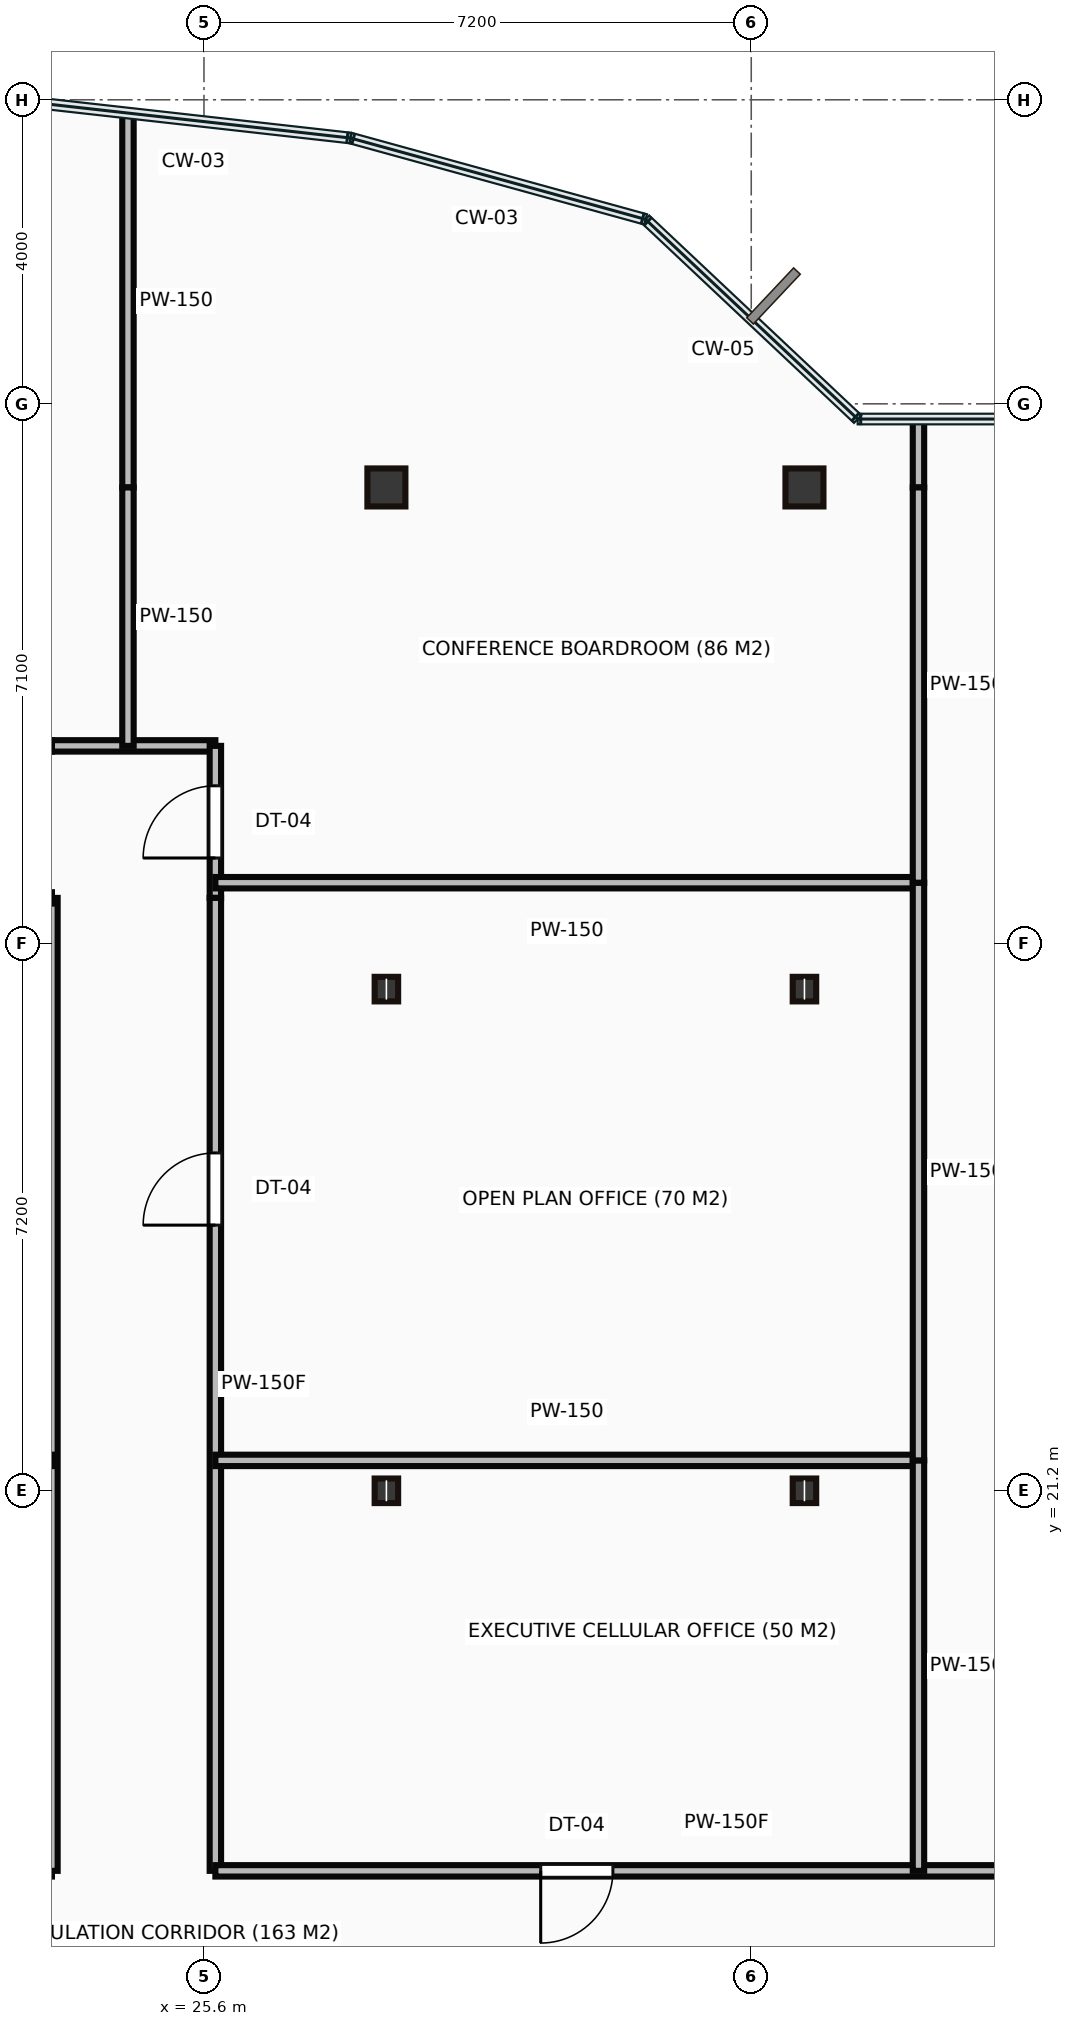
"""IFC4 building model, lengths in metres.
Left out: names, types, materials, properties, quantities, classifications, styles, units other than length and angle.
Written with IfcOpenShell. Run it as: python <this file> out.ifc"""

import sys

from ifc_helpers import new_model, si_unit, direction, frame, frame_2d, origin, origin_2d, place, context, subcontext, project, spatial, rectangle, hollow_rectangle, i_section, extrude, source, transform, mapped, element, fill, save


model = new_model("IFC4")
c1 = context("Model", 3, precision=1e-05, world=origin(), true_north=direction((0.0, 1.0)))
c2 = subcontext(c1, "Body", "Model", "MODEL_VIEW")
j1 = project(units=[si_unit("LENGTHUNIT", "METRE"), si_unit("PLANEANGLEUNIT", "RADIAN")], contexts=[c1])
p1 = place(None, origin())
s1 = spatial("IfcSite", under=j1, at=p1, CompositionType="ELEMENT")
p2 = place(p1, origin())
s2 = spatial("IfcBuilding", under=s1, at=p2, CompositionType="ELEMENT")
p3 = place(p2, frame((0.0, 0.0, 255.15)))
s3 = spatial("IfcBuildingStorey", under=s2, at=p3, CompositionType="ELEMENT", Elevation=255.15)
m1 = source(origin(), c2, "Body", "SweptSolid", [
    extrude(i_section(OverallWidth=0.309, OverallDepth=0.323, WebThickness=0.014, FlangeThickness=0.023, at=origin_2d()), origin(), (0.0, 0.0, 1.0), 3.65),
])
for number, where, z_axis, x_axis in (
    (1, (28.0, 21.2, 0.0), (0.0, 0.0, 1.0), (1.0, 0.0, 0.0)),
    (2, (28.0, 27.8, 0.0), (0.0, 0.0, 1.0), (1.0, 0.0, 0.0)),
):
    element("IfcColumn", number, at=place(p3, frame(where, z_axis=z_axis, x_axis=x_axis)), inside=s3, PredefinedType="COLUMN", context=c2, shape_type="MappedRepresentation", body=[
        mapped(m1, transform((0.0, 0.0, 0.0))),
    ])
m2 = source(origin(), c2, "Body", "SweptSolid", [
    extrude(hollow_rectangle(XDim=0.5, YDim=0.5, WallThickness=0.022, at=origin_2d()), origin(), (0.0, 0.0, 1.0), 3.65),
])
p4 = place(p3, frame((28.0, 34.4, 0.0), z_axis=(0.0, 0.0, 1.0), x_axis=(1.0, 0.0, 0.0)))
e3 = element("IfcColumn", 3, at=p4, inside=s3, PredefinedType="COLUMN", context=c2, shape_type="MappedRepresentation", body=[
    mapped(m2, transform((0.0, 0.0, 0.0))),
])
for number, where, z_axis, x_axis in (
    (4, (33.5, 21.2, 0.0), (0.0, 0.0, 1.0), (1.0, 0.0, 0.0)),
    (5, (33.5, 27.8, 0.0), (0.0, 0.0, 1.0), (1.0, 0.0, 0.0)),
):
    element("IfcColumn", number, at=place(p3, frame(where, z_axis=z_axis, x_axis=x_axis)), inside=s3, PredefinedType="COLUMN", context=c2, shape_type="MappedRepresentation", body=[
        mapped(m1, transform((0.0, 0.0, 0.0))),
    ])
p5 = place(p3, frame((33.5, 34.4, 0.0), z_axis=(0.0, 0.0, 1.0), x_axis=(1.0, 0.0, 0.0)))
e6 = element("IfcColumn", 6, at=p5, inside=s3, PredefinedType="COLUMN", context=c2, shape_type="MappedRepresentation", body=[
    mapped(m2, transform((0.0, 0.0, 0.0))),
])
m3 = source(origin(), c2, "Body", "SweptSolid", [
    extrude(rectangle(XDim=11.65, YDim=0.15, at=frame_2d((5.825, 0.0))), origin(), (0.0, 0.0, 1.0), 3.4),
])
p6 = place(p3, frame((11.95, 31.0, 0.0), z_axis=(0.0, 0.0, 1.0), x_axis=(1.0, 0.0, 0.0)))
e7 = element("IfcWall", 7, at=p6, inside=s3, PredefinedType="PARTITIONING", context=c2, shape_type="MappedRepresentation", body=[
    mapped(m3, transform((0.0, 0.0, 0.0))),
])
p7 = place(p6, frame((5.35, 0.0, 0.0)))
e8 = element("IfcOpeningElement", 8, at=p7, cuts=e7, PredefinedType="OPENING", context=c2, shape_type="SweptSolid", body=[
    extrude(rectangle(XDim=0.95, YDim=2.15, at=frame_2d((0.475, 1.075))), frame((0.0, 0.085, 0.0), z_axis=(0.0, -1.0, 0.0), x_axis=(1.0, 0.0, 0.0)), (0.0, 0.0, 1.0), 0.17),
])
m4 = source(origin(), c2, "Body", "SweptSolid", [
    extrude(rectangle(XDim=2.15, YDim=0.15, at=frame_2d((1.075, 0.0))), origin(), (0.0, 0.0, 1.0), 3.4),
])
p8 = place(p3, frame((23.6, 31.0, 0.0), z_axis=(0.0, 0.0, 1.0), x_axis=(1.0, 0.0, 0.0)))
e9 = element("IfcWall", 9, at=p8, inside=s3, PredefinedType="PARTITIONING", context=c2, shape_type="MappedRepresentation", body=[
    mapped(m4, transform((0.0, 0.0, 0.0))),
])
m5 = source(origin(), c2, "Body", "SweptSolid", [
    extrude(rectangle(XDim=2.0, YDim=0.15, at=frame_2d((1.0, 0.0))), origin(), (0.0, 0.0, 1.0), 3.4),
])
p9 = place(p3, frame((25.75, 31.0, 0.0), z_axis=(0.0, 0.0, 1.0), x_axis=(0.0, -1.0, 0.0)))
e10 = element("IfcWall", 10, at=p9, inside=s3, PredefinedType="PARTITIONING", context=c2, shape_type="MappedRepresentation", body=[
    mapped(m5, transform((0.0, 0.0, 0.0))),
])
p10 = place(p9, frame((0.525, 0.0, 0.0)))
e11 = element("IfcOpeningElement", 11, at=p10, cuts=e10, PredefinedType="OPENING", context=c2, shape_type="SweptSolid", body=[
    extrude(rectangle(XDim=0.95, YDim=2.15, at=frame_2d((0.475, 1.075))), frame((0.0, 0.085, 0.0), z_axis=(0.0, -1.0, 0.0), x_axis=(1.0, 0.0, 0.0)), (0.0, 0.0, 1.0), 0.17),
])
m6 = source(origin(), c2, "Body", "SweptSolid", [
    extrude(rectangle(XDim=12.8, YDim=0.15, at=frame_2d((6.4, 0.0))), origin(), (0.0, 0.0, 1.0), 3.4),
])
p11 = place(p3, frame((25.75, 29.0, 0.0), z_axis=(0.0, 0.0, 1.0), x_axis=(0.0, -1.0, 0.0)))
e12 = element("IfcWall", 12, at=p11, inside=s3, PredefinedType="PARTITIONING", context=c2, shape_type="MappedRepresentation", body=[
    mapped(m6, transform((0.0, 0.0, 0.0))),
])
p12 = place(p11, frame((3.355, 0.0, 0.0)))
e13 = element("IfcOpeningElement", 13, at=p12, cuts=e12, PredefinedType="OPENING", context=c2, shape_type="SweptSolid", body=[
    extrude(rectangle(XDim=0.95, YDim=2.15, at=frame_2d((0.475, 1.075))), frame((0.0, 0.085, 0.0), z_axis=(0.0, -1.0, 0.0), x_axis=(1.0, 0.0, 0.0)), (0.0, 0.0, 1.0), 0.17),
])
m7 = source(origin(), c2, "Body", "SweptSolid", [
    extrude(rectangle(XDim=13.45, YDim=0.15, at=frame_2d((6.725, 0.0))), origin(), (0.0, 0.0, 1.0), 3.4),
])
p13 = place(p3, frame((25.75, 16.2, 0.0), z_axis=(0.0, 0.0, 1.0), x_axis=(1.0, 0.0, 0.0)))
e14 = element("IfcWall", 14, at=p13, inside=s3, PredefinedType="PARTITIONING", context=c2, shape_type="MappedRepresentation", body=[
    mapped(m7, transform((0.0, 0.0, 0.0))),
])
p14 = place(p13, frame((4.28, 0.0, 0.0)))
e15 = element("IfcOpeningElement", 15, at=p14, cuts=e14, PredefinedType="OPENING", context=c2, shape_type="SweptSolid", body=[
    extrude(rectangle(XDim=0.95, YDim=2.15, at=frame_2d((0.475, 1.075))), frame((0.0, 0.085, 0.0), z_axis=(0.0, -1.0, 0.0), x_axis=(1.0, 0.0, 0.0)), (0.0, 0.0, 1.0), 0.17),
])
p15 = place(p13, frame((10.745, 0.0, 0.0)))
e16 = element("IfcOpeningElement", 16, at=p15, cuts=e14, PredefinedType="OPENING", context=c2, shape_type="SweptSolid", body=[
    extrude(rectangle(XDim=0.95, YDim=2.15, at=frame_2d((0.475, 1.075))), frame((0.0, 0.085, 0.0), z_axis=(0.0, -1.0, 0.0), x_axis=(1.0, 0.0, 0.0)), (0.0, 0.0, 1.0), 0.17),
])
p16 = place(p3, frame((11.95, 16.2, 0.0), z_axis=(0.0, 0.0, 1.0), x_axis=(1.0, 0.0, 0.0)))
e17 = element("IfcWall", 17, at=p16, inside=s3, PredefinedType="PARTITIONING", context=c2, shape_type="MappedRepresentation", body=[
    mapped(m3, transform((0.0, 0.0, 0.0))),
])
p17 = place(p16, frame((5.35, 0.0, 0.0)))
e18 = element("IfcOpeningElement", 18, at=p17, cuts=e17, PredefinedType="OPENING", context=c2, shape_type="SweptSolid", body=[
    extrude(rectangle(XDim=0.95, YDim=2.15, at=frame_2d((0.475, 1.075))), frame((0.0, 0.085, 0.0), z_axis=(0.0, -1.0, 0.0), x_axis=(1.0, 0.0, 0.0)), (0.0, 0.0, 1.0), 0.17),
])
p18 = place(p3, frame((23.6, 16.2, 0.0), z_axis=(0.0, 0.0, 1.0), x_axis=(0.0, 1.0, 0.0)))
e19 = element("IfcWall", 19, at=p18, inside=s3, PredefinedType="PARTITIONING", context=c2, shape_type="MappedRepresentation", body=[
    mapped(m6, transform((0.0, 0.0, 0.0))),
])
m8 = source(origin(), c2, "Body", "SweptSolid", [
    extrude(rectangle(XDim=4.905, YDim=0.15, at=frame_2d((2.453, 0.0))), origin(), (0.0, 0.0, 1.0), 3.4),
])
p19 = place(p3, frame((24.6, 39.305, 0.0), z_axis=(0.0, 0.0, 1.0), x_axis=(0.0, -1.0, 0.0)))
e20 = element("IfcWall", 20, at=p19, inside=s3, PredefinedType="PARTITIONING", context=c2, shape_type="MappedRepresentation", body=[
    mapped(m8, transform((0.0, 0.0, 0.0))),
])
m9 = source(origin(), c2, "Body", "SweptSolid", [
    extrude(rectangle(XDim=3.4, YDim=0.15, at=frame_2d((1.7, 0.0))), origin(), (0.0, 0.0, 1.0), 3.4),
])
p20 = place(p3, frame((24.6, 34.4, 0.0), z_axis=(0.0, 0.0, 1.0), x_axis=(0.0, -1.0, 0.0)))
e21 = element("IfcWall", 21, at=p20, inside=s3, PredefinedType="PARTITIONING", context=c2, shape_type="MappedRepresentation", body=[
    mapped(m9, transform((0.0, 0.0, 0.0))),
])
m10 = source(origin(), c2, "Body", "SweptSolid", [
    extrude(rectangle(XDim=9.25, YDim=0.15, at=frame_2d((4.625, 0.0))), origin(), (0.0, 0.0, 1.0), 3.4),
])
for number, where, z_axis, x_axis in (
    (22, (25.75, 21.6, 0.0), (0.0, 0.0, 1.0), (1.0, 0.0, 0.0)),
    (23, (35.0, 29.2, 0.0), (0.0, 0.0, 1.0), (-1.0, 0.0, 0.0)),
):
    element("IfcWall", number, at=place(p3, frame(where, z_axis=z_axis, x_axis=x_axis)), inside=s3, PredefinedType="PARTITIONING", context=c2, shape_type="MappedRepresentation", body=[
        mapped(m10, transform((0.0, 0.0, 0.0))),
    ])
m11 = source(origin(), c2, "Body", "SweptSolid", [
    extrude(rectangle(XDim=5.4, YDim=0.15, at=frame_2d((2.7, 0.0))), origin(), (0.0, 0.0, 1.0), 3.4),
])
p21 = place(p3, frame((35.0, 21.6, 0.0), z_axis=(0.0, 0.0, 1.0), x_axis=(0.0, -1.0, 0.0)))
e24 = element("IfcWall", 24, at=p21, inside=s3, PredefinedType="PARTITIONING", context=c2, shape_type="MappedRepresentation", body=[
    mapped(m11, transform((0.0, 0.0, 0.0))),
])
m12 = source(origin(), c2, "Body", "SweptSolid", [
    extrude(rectangle(XDim=7.6, YDim=0.15, at=frame_2d((3.8, 0.0))), origin(), (0.0, 0.0, 1.0), 3.4),
])
p22 = place(p3, frame((35.0, 29.2, 0.0), z_axis=(0.0, 0.0, 1.0), x_axis=(0.0, -1.0, 0.0)))
e25 = element("IfcWall", 25, at=p22, inside=s3, PredefinedType="PARTITIONING", context=c2, shape_type="MappedRepresentation", body=[
    mapped(m12, transform((0.0, 0.0, 0.0))),
])
m13 = source(origin(), c2, "Body", "SweptSolid", [
    extrude(rectangle(XDim=0.88, YDim=0.15, at=frame_2d((0.44, 0.0))), origin(), (0.0, 0.0, 1.0), 3.4),
])
p23 = place(p3, frame((35.0, 35.28, 0.0), z_axis=(0.0, 0.0, 1.0), x_axis=(0.0, -1.0, 0.0)))
e26 = element("IfcWall", 26, at=p23, inside=s3, PredefinedType="PARTITIONING", context=c2, shape_type="MappedRepresentation", body=[
    mapped(m13, transform((0.0, 0.0, 0.0))),
])
m14 = source(origin(), c2, "Body", "SweptSolid", [
    extrude(rectangle(XDim=5.2, YDim=0.15, at=frame_2d((2.6, 0.0))), origin(), (0.0, 0.0, 1.0), 3.4),
])
p24 = place(p3, frame((35.0, 34.4, 0.0), z_axis=(0.0, 0.0, 1.0), x_axis=(0.0, -1.0, 0.0)))
e27 = element("IfcWall", 27, at=p24, inside=s3, PredefinedType="PARTITIONING", context=c2, shape_type="MappedRepresentation", body=[
    mapped(m14, transform((0.0, 0.0, 0.0))),
])
m15 = source(origin(), c2, "Body", "SweptSolid", [
    extrude(rectangle(XDim=0.95, YDim=2.15, at=frame_2d((0.475, 1.075))), frame((0.0, 0.025, 0.0), z_axis=(0.0, -1.0, 0.0), x_axis=(1.0, 0.0, 0.0)), (0.0, 0.0, 1.0), 0.05),
])
p25 = place(p10, origin())
e28 = element("IfcDoor", 28, at=p25, inside=s3, OperationType="SINGLE_SWING_RIGHT", PredefinedType="DOOR", context=c2, shape_type="MappedRepresentation", body=[
    mapped(m15, transform((0.0, 0.0, 0.0))),
])
fill(e11, e28)
p26 = place(p14, origin())
e29 = element("IfcDoor", 29, at=p26, inside=s3, OperationType="SINGLE_SWING_LEFT", PredefinedType="DOOR", context=c2, shape_type="MappedRepresentation", body=[
    mapped(m15, transform((0.0, 0.0, 0.0))),
])
fill(e15, e29)
p27 = place(p12, origin())
e30 = element("IfcDoor", 30, at=p27, inside=s3, OperationType="SINGLE_SWING_RIGHT", PredefinedType="DOOR", context=c2, shape_type="MappedRepresentation", body=[
    mapped(m15, transform((0.0, 0.0, 0.0))),
])
fill(e13, e30)
save(model, sys.argv[1])
